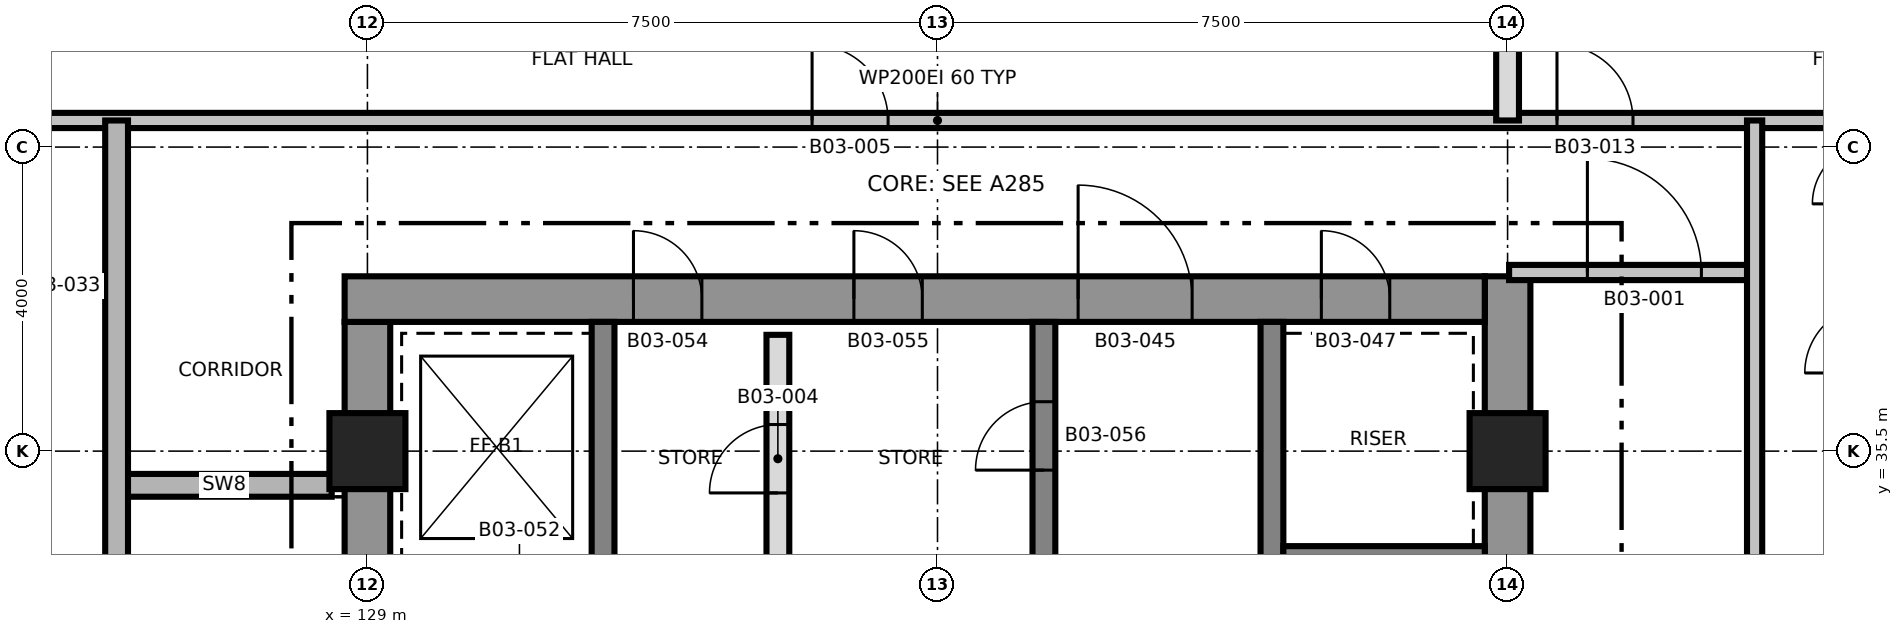
"""IFC4 building model, lengths in metres.
Left out: names, types, materials, properties, quantities, classifications, styles, units other than length and angle.
Written with IfcOpenShell. Run it as: python <this file> out.ifc"""

import sys

from ifc_helpers import new_model, si_unit, direction, frame, frame_2d, origin, origin_2d, place, context, subcontext, project, spatial, rectangle, extrude, element, fill, save


model = new_model("IFC4")
c1 = context("Model", 3, precision=1e-05, world=origin(), true_north=direction((0.0, 1.0)))
c2 = subcontext(c1, "Body", "Model", "MODEL_VIEW")
j1 = project(units=[si_unit("LENGTHUNIT", "METRE"), si_unit("PLANEANGLEUNIT", "RADIAN")], contexts=[c1])
p1 = place(None, origin())
s1 = spatial("IfcSite", under=j1, at=p1, CompositionType="ELEMENT")
p2 = place(p1, origin())
s2 = spatial("IfcBuilding", under=s1, at=p2, CompositionType="ELEMENT")
p3 = place(p2, frame((0.0, 0.0, 52.0)))
s3 = spatial("IfcBuildingStorey", under=s2, at=p3, CompositionType="ELEMENT", Elevation=52.0)
p4 = place(p3, frame((129.0, 24.8, 0.0), z_axis=(0.0, 0.0, 1.0), x_axis=(0.0, 1.0, 0.0)))
e1 = element("IfcWall", 1, at=p4, inside=s3, PredefinedType="SHEAR", context=c2, shape_type="SweptSolid", body=[
    extrude(rectangle(XDim=12.4, YDim=0.6, at=frame_2d((6.2, 0.0))), origin(), (0.0, 0.0, 1.0), 3.7),
])
p5 = place(p4, frame((5.15, 0.0, 0.0)))
e2 = element("IfcOpeningElement", 2, at=p5, cuts=e1, PredefinedType="OPENING", context=c2, shape_type="SweptSolid", body=[
    extrude(rectangle(XDim=1.0, YDim=2.1, at=frame_2d((0.5, 1.05))), frame((0.0, 0.31, 0.0), z_axis=(0.0, -1.0, 0.0), x_axis=(1.0, 0.0, 0.0)), (0.0, 0.0, 1.0), 0.62),
])
p6 = place(p3, frame((144.0, 24.2, 0.0), z_axis=(0.0, 0.0, 1.0), x_axis=(0.0, 1.0, 0.0)))
e3 = element("IfcWall", 3, at=p6, inside=s3, PredefinedType="SHEAR", context=c2, shape_type="SweptSolid", body=[
    extrude(rectangle(XDim=13.6, YDim=0.6, at=frame_2d((6.8, 0.0))), origin(), (0.0, 0.0, 1.0), 3.7),
])
p7 = place(p3, frame((128.7, 37.5, 0.0), z_axis=(0.0, 0.0, 1.0), x_axis=(1.0, 0.0, 0.0)))
e4 = element("IfcWall", 4, at=p7, inside=s3, PredefinedType="SHEAR", context=c2, shape_type="SweptSolid", body=[
    extrude(rectangle(XDim=15.0, YDim=0.6, at=frame_2d((7.5, 0.0))), origin(), (0.0, 0.0, 1.0), 3.7),
])
p8 = place(p7, frame((9.65, 0.0, 0.0)))
e5 = element("IfcOpeningElement", 5, at=p8, cuts=e4, PredefinedType="OPENING", context=c2, shape_type="SweptSolid", body=[
    extrude(rectangle(XDim=1.5, YDim=2.1, at=frame_2d((0.75, 1.05))), frame((0.0, 0.31, 0.0), z_axis=(0.0, -1.0, 0.0), x_axis=(1.0, 0.0, 0.0)), (0.0, 0.0, 1.0), 0.62),
])
p9 = place(p7, frame((12.85, 0.0, 0.0)))
e6 = element("IfcOpeningElement", 6, at=p9, cuts=e4, PredefinedType="OPENING", context=c2, shape_type="SweptSolid", body=[
    extrude(rectangle(XDim=0.9, YDim=2.1, at=frame_2d((0.45, 1.05))), frame((0.0, 0.31, 0.0), z_axis=(0.0, -1.0, 0.0), x_axis=(1.0, 0.0, 0.0)), (0.0, 0.0, 1.0), 0.62),
])
p10 = place(p7, frame((3.8, 0.0, 0.0)))
e7 = element("IfcOpeningElement", 7, at=p10, cuts=e4, PredefinedType="OPENING", context=c2, shape_type="SweptSolid", body=[
    extrude(rectangle(XDim=0.9, YDim=2.1, at=frame_2d((0.45, 1.05))), frame((0.0, 0.31, 0.0), z_axis=(0.0, -1.0, 0.0), x_axis=(1.0, 0.0, 0.0)), (0.0, 0.0, 1.0), 0.62),
])
p11 = place(p7, frame((6.7, 0.0, 0.0)))
e8 = element("IfcOpeningElement", 8, at=p11, cuts=e4, PredefinedType="OPENING", context=c2, shape_type="SweptSolid", body=[
    extrude(rectangle(XDim=0.9, YDim=2.1, at=frame_2d((0.45, 1.05))), frame((0.0, 0.31, 0.0), z_axis=(0.0, -1.0, 0.0), x_axis=(1.0, 0.0, 0.0)), (0.0, 0.0, 1.0), 0.62),
])
p12 = place(p3, frame((132.1, 24.8, 0.0), z_axis=(0.0, 0.0, 1.0), x_axis=(0.0, 1.0, 0.0)))
e9 = element("IfcWall", 9, at=p12, inside=s3, PredefinedType="SHEAR", context=c2, shape_type="SweptSolid", body=[
    extrude(rectangle(XDim=12.4, YDim=0.3, at=frame_2d((6.2, 0.0))), origin(), (0.0, 0.0, 1.0), 3.7),
])
p13 = place(p12, frame((3.9, 0.0, 0.0)))
e10 = element("IfcOpeningElement", 10, at=p13, cuts=e9, PredefinedType="OPENING", context=c2, shape_type="SweptSolid", body=[
    extrude(rectangle(XDim=1.2, YDim=2.1, at=frame_2d((0.6, 1.05))), frame((0.0, 0.16, 0.0), z_axis=(0.0, -1.0, 0.0), x_axis=(1.0, 0.0, 0.0)), (0.0, 0.0, 1.0), 0.32),
])
p14 = place(p3, frame((137.9, 24.8, 0.0), z_axis=(0.0, 0.0, 1.0), x_axis=(0.0, 1.0, 0.0)))
e11 = element("IfcWall", 11, at=p14, inside=s3, PredefinedType="SHEAR", context=c2, shape_type="SweptSolid", body=[
    extrude(rectangle(XDim=12.4, YDim=0.3, at=frame_2d((6.2, 0.0))), origin(), (0.0, 0.0, 1.0), 3.7),
])
p15 = place(p14, frame((3.95, 0.0, 0.0)))
e12 = element("IfcOpeningElement", 12, at=p15, cuts=e11, PredefinedType="OPENING", context=c2, shape_type="SweptSolid", body=[
    extrude(rectangle(XDim=1.5, YDim=2.1, at=frame_2d((0.75, 1.05))), frame((0.0, 0.16, 0.0), z_axis=(0.0, -1.0, 0.0), x_axis=(1.0, 0.0, 0.0)), (0.0, 0.0, 1.0), 0.32),
])
p16 = place(p14, frame((10.45, 0.0, 0.0)))
e13 = element("IfcOpeningElement", 13, at=p16, cuts=e11, PredefinedType="OPENING", context=c2, shape_type="SweptSolid", body=[
    extrude(rectangle(XDim=0.9, YDim=2.1, at=frame_2d((0.45, 1.05))), frame((0.0, 0.16, 0.0), z_axis=(0.0, -1.0, 0.0), x_axis=(1.0, 0.0, 0.0)), (0.0, 0.0, 1.0), 0.32),
])
p17 = place(p3, frame((140.9, 24.8, 0.0), z_axis=(0.0, 0.0, 1.0), x_axis=(0.0, 1.0, 0.0)))
e14 = element("IfcWall", 14, at=p17, inside=s3, PredefinedType="SHEAR", context=c2, shape_type="SweptSolid", body=[
    extrude(rectangle(XDim=12.4, YDim=0.3, at=frame_2d((6.2, 0.0))), origin(), (0.0, 0.0, 1.0), 3.7),
])
p18 = place(p17, frame((5.9, 0.0, 0.0)))
e15 = element("IfcOpeningElement", 15, at=p18, cuts=e14, PredefinedType="OPENING", context=c2, shape_type="SweptSolid", body=[
    extrude(rectangle(XDim=1.2, YDim=2.1, at=frame_2d((0.6, 1.05))), frame((0.0, 0.16, 0.0), z_axis=(0.0, -1.0, 0.0), x_axis=(1.0, 0.0, 0.0)), (0.0, 0.0, 1.0), 0.32),
])
p19 = place(p3, frame((141.05, 34.1, 0.0), z_axis=(0.0, 0.0, 1.0), x_axis=(1.0, 0.0, 0.0)))
e16 = element("IfcWall", 16, at=p19, inside=s3, PredefinedType="SHEAR", context=c2, shape_type="SweptSolid", body=[
    extrude(rectangle(XDim=2.65, YDim=0.3, at=frame_2d((1.325, 0.0))), origin(), (0.0, 0.0, 1.0), 3.7),
])
for number, where, z_axis, x_axis in (
    (17, (129.0, 35.5, 0.0), (0.0, 0.0, 1.0), (1.0, 0.0, 0.0)),
    (18, (144.0, 35.5, 0.0), (0.0, 0.0, 1.0), (1.0, 0.0, 0.0)),
):
    element("IfcColumn", number, at=place(p3, frame(where, z_axis=z_axis, x_axis=x_axis)), inside=s3, PredefinedType="COLUMN", context=c2, shape_type="SweptSolid", body=[
        extrude(rectangle(XDim=1.0, YDim=1.0, at=origin_2d()), origin(), (0.0, 0.0, 1.0), 3.7),
    ])
p20 = place(p3, frame((125.7, 35.05, 0.0), z_axis=(0.0, 0.0, 1.0), x_axis=(1.0, 0.0, 0.0)))
e19 = element("IfcWall", 19, at=p20, inside=s3, PredefinedType="SHEAR", context=c2, shape_type="SweptSolid", body=[
    extrude(rectangle(XDim=2.83, YDim=0.3, at=frame_2d((1.415, 0.0))), origin(), (0.0, 0.0, 1.0), 3.4),
])
p21 = place(p3, frame((144.02, 37.85, 0.0), z_axis=(0.0, 0.0, 1.0), x_axis=(1.0, 0.0, 0.0)))
e20 = element("IfcWall", 20, at=p21, inside=s3, PredefinedType="PARTITIONING", context=c2, shape_type="SweptSolid", body=[
    extrude(rectangle(XDim=3.23, YDim=0.2, at=frame_2d((1.615, 0.0))), origin(), (0.0, 0.0, 1.0), 3.4),
])
p22 = place(p21, frame((1.03, 0.0, 0.0)))
e21 = element("IfcOpeningElement", 21, at=p22, cuts=e20, PredefinedType="OPENING", context=c2, shape_type="SweptSolid", body=[
    extrude(rectangle(XDim=1.5, YDim=2.1, at=frame_2d((0.75, 1.05))), frame((0.0, 0.11, 0.0), z_axis=(0.0, -1.0, 0.0), x_axis=(1.0, 0.0, 0.0)), (0.0, 0.0, 1.0), 0.22),
])
p23 = place(p3, frame((119.58, 39.85, 0.0), z_axis=(0.0, 0.0, 1.0), x_axis=(1.0, 0.0, 0.0)))
e22 = element("IfcWall", 22, at=p23, inside=s3, PredefinedType="PARTITIONING", context=c2, shape_type="SweptSolid", body=[
    extrude(rectangle(XDim=33.84, YDim=0.2, at=frame_2d((16.92, 0.0))), origin(), (0.0, 0.0, 1.0), 3.4),
])
p24 = place(p23, frame((15.27, 0.0, 0.0)))
e23 = element("IfcOpeningElement", 23, at=p24, cuts=e22, PredefinedType="OPENING", context=c2, shape_type="SweptSolid", body=[
    extrude(rectangle(XDim=1.0, YDim=2.1, at=frame_2d((0.5, 1.05))), frame((0.0, 0.11, 0.0), z_axis=(0.0, -1.0, 0.0), x_axis=(1.0, 0.0, 0.0)), (0.0, 0.0, 1.0), 0.22),
])
p25 = place(p23, frame((25.07, 0.0, 0.0)))
e24 = element("IfcOpeningElement", 24, at=p25, cuts=e22, PredefinedType="OPENING", context=c2, shape_type="SweptSolid", body=[
    extrude(rectangle(XDim=1.0, YDim=2.1, at=frame_2d((0.5, 1.05))), frame((0.0, 0.11, 0.0), z_axis=(0.0, -1.0, 0.0), x_axis=(1.0, 0.0, 0.0)), (0.0, 0.0, 1.0), 0.22),
])
p26 = place(p3, frame((125.7, 22.15, 0.0), z_axis=(0.0, 0.0, 1.0), x_axis=(0.0, 1.0, 0.0)))
e25 = element("IfcWall", 25, at=p26, inside=s3, PredefinedType="SHEAR", context=c2, shape_type="SweptSolid", body=[
    extrude(rectangle(XDim=17.7, YDim=0.3, at=frame_2d((8.85, 0.0))), origin(), (0.0, 0.0, 1.0), 3.4),
])
p27 = place(p26, frame((2.7, 0.0, 0.0)))
e26 = element("IfcOpeningElement", 26, at=p27, cuts=e25, PredefinedType="OPENING", context=c2, shape_type="SweptSolid", body=[
    extrude(rectangle(XDim=1.0, YDim=2.1, at=frame_2d((0.5, 1.05))), frame((0.0, 0.16, 0.0), z_axis=(0.0, -1.0, 0.0), x_axis=(1.0, 0.0, 0.0)), (0.0, 0.0, 1.0), 0.32),
])
p28 = place(p3, frame((134.4, 33.77, 0.0), z_axis=(0.0, 0.0, 1.0), x_axis=(0.0, 1.0, 0.0)))
e27 = element("IfcWall", 27, at=p28, inside=s3, PredefinedType="PARTITIONING", context=c2, shape_type="SweptSolid", body=[
    extrude(rectangle(XDim=3.26, YDim=0.3, at=frame_2d((1.63, 0.0))), origin(), (0.0, 0.0, 1.0), 3.4),
])
p29 = place(p28, frame((1.18, 0.0, 0.0)))
e28 = element("IfcOpeningElement", 28, at=p29, cuts=e27, PredefinedType="OPENING", context=c2, shape_type="SweptSolid", body=[
    extrude(rectangle(XDim=0.9, YDim=2.1, at=frame_2d((0.45, 1.05))), frame((0.0, 0.16, 0.0), z_axis=(0.0, -1.0, 0.0), x_axis=(1.0, 0.0, 0.0)), (0.0, 0.0, 1.0), 0.32),
])
p30 = place(p3, frame((144.0, 39.85, 0.0), z_axis=(0.0, 0.0, 1.0), x_axis=(0.0, 1.0, 0.0)))
e29 = element("IfcWall", 29, at=p30, inside=s3, PredefinedType="PARTITIONING", context=c2, shape_type="SweptSolid", body=[
    extrude(rectangle(XDim=6.57, YDim=0.3, at=frame_2d((3.285, 0.0))), origin(), (0.0, 0.0, 1.0), 3.4),
])
p31 = place(p3, frame((147.25, 22.15, 0.0), z_axis=(0.0, 0.0, 1.0), x_axis=(0.0, 1.0, 0.0)))
e30 = element("IfcWall", 30, at=p31, inside=s3, PredefinedType="PARTITIONING", context=c2, shape_type="SweptSolid", body=[
    extrude(rectangle(XDim=17.7, YDim=0.2, at=frame_2d((8.85, 0.0))), origin(), (0.0, 0.0, 1.0), 3.4),
])
p32 = place(p31, frame((2.65, 0.0, 0.0)))
e31 = element("IfcOpeningElement", 31, at=p32, cuts=e30, PredefinedType="OPENING", context=c2, shape_type="SweptSolid", body=[
    extrude(rectangle(XDim=1.0, YDim=2.1, at=frame_2d((0.5, 1.05))), frame((0.0, 0.11, 0.0), z_axis=(0.0, -1.0, 0.0), x_axis=(1.0, 0.0, 0.0)), (0.0, 0.0, 1.0), 0.22),
])
p33 = place(p22, origin())
e32 = element("IfcDoor", 32, at=p33, inside=s3, OperationType="SINGLE_SWING_LEFT", PredefinedType="DOOR", context=c2, shape_type="SweptSolid", body=[
    extrude(rectangle(XDim=1.5, YDim=2.1, at=frame_2d((0.75, 1.05))), frame((0.0, 0.025, 0.0), z_axis=(0.0, -1.0, 0.0), x_axis=(1.0, 0.0, 0.0)), (0.0, 0.0, 1.0), 0.05),
])
fill(e21, e32)
p34 = place(p29, origin())
e33 = element("IfcDoor", 33, at=p34, inside=s3, OperationType="SINGLE_SWING_RIGHT", PredefinedType="DOOR", context=c2, shape_type="SweptSolid", body=[
    extrude(rectangle(XDim=0.9, YDim=2.1, at=frame_2d((0.45, 1.05))), frame((0.0, 0.025, 0.0), z_axis=(0.0, -1.0, 0.0), x_axis=(1.0, 0.0, 0.0)), (0.0, 0.0, 1.0), 0.05),
])
fill(e28, e33)
p35 = place(p24, origin())
e34 = element("IfcDoor", 34, at=p35, inside=s3, OperationType="SINGLE_SWING_LEFT", PredefinedType="DOOR", context=c2, shape_type="SweptSolid", body=[
    extrude(rectangle(XDim=1.0, YDim=2.1, at=frame_2d((0.5, 1.05))), frame((0.0, 0.025, 0.0), z_axis=(0.0, -1.0, 0.0), x_axis=(1.0, 0.0, 0.0)), (0.0, 0.0, 1.0), 0.05),
])
fill(e23, e34)
p36 = place(p25, origin())
e35 = element("IfcDoor", 35, at=p36, inside=s3, OperationType="SINGLE_SWING_LEFT", PredefinedType="DOOR", context=c2, shape_type="SweptSolid", body=[
    extrude(rectangle(XDim=1.0, YDim=2.1, at=frame_2d((0.5, 1.05))), frame((0.0, 0.025, 0.0), z_axis=(0.0, -1.0, 0.0), x_axis=(1.0, 0.0, 0.0)), (0.0, 0.0, 1.0), 0.05),
])
fill(e24, e35)
p37 = place(p8, origin())
e36 = element("IfcDoor", 36, at=p37, inside=s3, OperationType="SINGLE_SWING_RIGHT", PredefinedType="DOOR", context=c2, shape_type="SweptSolid", body=[
    extrude(rectangle(XDim=1.5, YDim=2.1, at=frame_2d((0.75, 1.05))), frame((0.0, 0.025, 0.0), z_axis=(0.0, -1.0, 0.0), x_axis=(1.0, 0.0, 0.0)), (0.0, 0.0, 1.0), 0.05),
])
fill(e5, e36)
p38 = place(p9, origin())
e37 = element("IfcDoor", 37, at=p38, inside=s3, OperationType="SINGLE_SWING_RIGHT", PredefinedType="DOOR", context=c2, shape_type="SweptSolid", body=[
    extrude(rectangle(XDim=0.9, YDim=2.1, at=frame_2d((0.45, 1.05))), frame((0.0, 0.025, 0.0), z_axis=(0.0, -1.0, 0.0), x_axis=(1.0, 0.0, 0.0)), (0.0, 0.0, 1.0), 0.05),
])
fill(e6, e37)
p39 = place(p10, origin())
e38 = element("IfcDoor", 38, at=p39, inside=s3, OperationType="SINGLE_SWING_LEFT", PredefinedType="DOOR", context=c2, shape_type="SweptSolid", body=[
    extrude(rectangle(XDim=0.9, YDim=2.1, at=frame_2d((0.45, 1.05))), frame((0.0, 0.025, 0.0), z_axis=(0.0, -1.0, 0.0), x_axis=(1.0, 0.0, 0.0)), (0.0, 0.0, 1.0), 0.05),
])
fill(e7, e38)
p40 = place(p11, origin())
e39 = element("IfcDoor", 39, at=p40, inside=s3, OperationType="SINGLE_SWING_RIGHT", PredefinedType="DOOR", context=c2, shape_type="SweptSolid", body=[
    extrude(rectangle(XDim=0.9, YDim=2.1, at=frame_2d((0.45, 1.05))), frame((0.0, 0.025, 0.0), z_axis=(0.0, -1.0, 0.0), x_axis=(1.0, 0.0, 0.0)), (0.0, 0.0, 1.0), 0.05),
])
fill(e8, e39)
p41 = place(p16, origin())
e40 = element("IfcDoor", 40, at=p41, inside=s3, OperationType="SINGLE_SWING_RIGHT", PredefinedType="DOOR", context=c2, shape_type="SweptSolid", body=[
    extrude(rectangle(XDim=0.9, YDim=2.1, at=frame_2d((0.45, 1.05))), frame((0.0, 0.025, 0.0), z_axis=(0.0, -1.0, 0.0), x_axis=(1.0, 0.0, 0.0)), (0.0, 0.0, 1.0), 0.05),
])
fill(e13, e40)
save(model, sys.argv[1])
